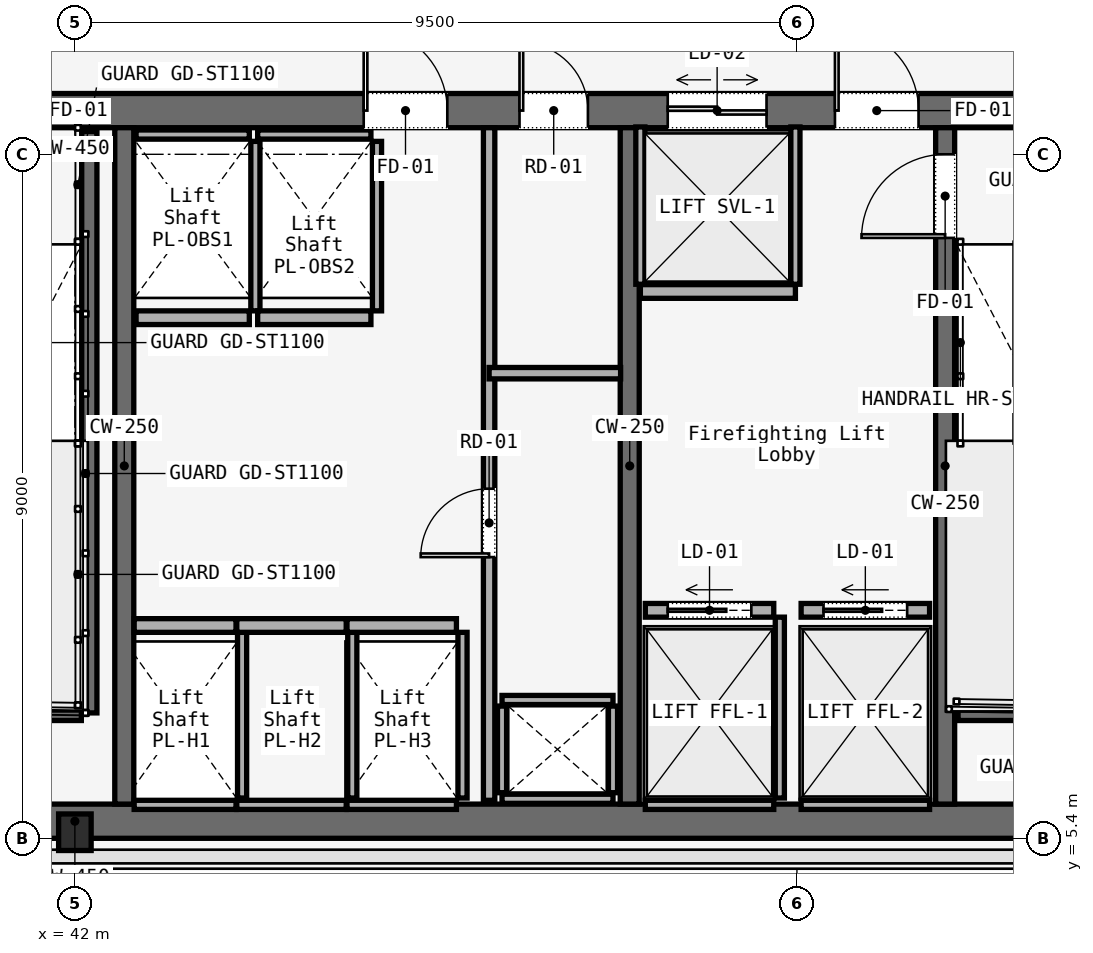
"""IFC4 building model, lengths in metres.
Left out: names, types, materials, properties, quantities, classifications, styles, units other than length and angle.
Written with IfcOpenShell. Run it as: python <this file> out.ifc"""

import sys

from ifc_helpers import new_model, si_unit, direction, frame, frame_2d, origin, origin_2d, place, context, subcontext, project, spatial, rectangle, i_section, extrude, element, fill, save


model = new_model("IFC4")
c1 = context("Model", 3, precision=1e-05, world=origin(), true_north=direction((0.0, 1.0)))
c2 = subcontext(c1, "Body", "Model", "MODEL_VIEW")
j1 = project(units=[si_unit("LENGTHUNIT", "METRE"), si_unit("PLANEANGLEUNIT", "RADIAN")], contexts=[c1])
p1 = place(None, origin())
s1 = spatial("IfcSite", under=j1, at=p1, CompositionType="ELEMENT")
p2 = place(p1, origin())
s2 = spatial("IfcBuilding", under=s1, at=p2, CompositionType="ELEMENT")
p3 = place(p2, frame((0.0, 0.0, 153.6)))
s3 = spatial("IfcBuildingStorey", under=s2, at=p3, CompositionType="ELEMENT", Elevation=153.6)
p4 = place(p3, frame((26.45, 14.975, 0.0), z_axis=(0.0, 0.0, 1.0), x_axis=(1.0, 0.0, 0.0)))
e1 = element("IfcWall", 1, at=p4, inside=s3, PredefinedType="SOLIDWALL", context=c2, shape_type="SweptSolid", body=[
    extrude(rectangle(XDim=31.1, YDim=0.45, at=frame_2d((15.55, 0.0))), origin(), (0.0, 0.0, 1.0), 3.58),
])
p5 = place(p4, frame((1.65, 0.0, 0.0)))
e2 = element("IfcOpeningElement", 2, at=p5, cuts=e1, PredefinedType="OPENING", context=c2, shape_type="SweptSolid", body=[
    extrude(rectangle(XDim=1.1, YDim=2.2, at=frame_2d((0.55, 1.1))), frame((0.0, 0.225, 0.0), z_axis=(0.0, -1.0, 0.0), x_axis=(1.0, 0.0, 0.0)), (0.0, 0.0, 1.0), 0.45),
])
p6 = place(p4, frame((13.65, 0.0, 0.0)))
e3 = element("IfcOpeningElement", 3, at=p6, cuts=e1, PredefinedType="OPENING", context=c2, shape_type="SweptSolid", body=[
    extrude(rectangle(XDim=1.1, YDim=2.2, at=frame_2d((0.55, 1.1))), frame((0.0, 0.225, 0.0), z_axis=(0.0, -1.0, 0.0), x_axis=(1.0, 0.0, 0.0)), (0.0, 0.0, 1.0), 0.45),
])
p7 = place(p4, frame((25.55, 0.0, 0.0)))
e4 = element("IfcOpeningElement", 4, at=p7, cuts=e1, PredefinedType="OPENING", context=c2, shape_type="SweptSolid", body=[
    extrude(rectangle(XDim=1.1, YDim=2.2, at=frame_2d((0.55, 1.1))), frame((0.0, 0.225, 0.0), z_axis=(0.0, -1.0, 0.0), x_axis=(1.0, 0.0, 0.0)), (0.0, 0.0, 1.0), 0.45),
])
p8 = place(p4, frame((10.7, 0.0, 0.0)))
e5 = element("IfcOpeningElement", 5, at=p8, cuts=e1, PredefinedType="OPENING", context=c2, shape_type="SweptSolid", body=[
    extrude(rectangle(XDim=1.4, YDim=2.2, at=frame_2d((0.7, 1.1))), frame((0.0, 0.225, 0.0), z_axis=(0.0, -1.0, 0.0), x_axis=(1.0, 0.0, 0.0)), (0.0, 0.0, 1.0), 0.45),
])
p9 = place(p4, frame((19.35, 0.0, 0.0)))
e6 = element("IfcOpeningElement", 6, at=p9, cuts=e1, PredefinedType="OPENING", context=c2, shape_type="SweptSolid", body=[
    extrude(rectangle(XDim=1.1, YDim=2.2, at=frame_2d((0.55, 1.1))), frame((0.0, 0.225, 0.0), z_axis=(0.0, -1.0, 0.0), x_axis=(1.0, 0.0, 0.0)), (0.0, 0.0, 1.0), 0.45),
])
p10 = place(p4, frame((21.4, 0.0, 0.0)))
e7 = element("IfcOpeningElement", 7, at=p10, cuts=e1, PredefinedType="OPENING", context=c2, shape_type="SweptSolid", body=[
    extrude(rectangle(XDim=0.9, YDim=2.1, at=frame_2d((0.45, 1.05))), frame((0.0, 0.225, 0.0), z_axis=(0.0, -1.0, 0.0), x_axis=(1.0, 0.0, 0.0)), (0.0, 0.0, 1.0), 0.45),
])
p11 = place(p4, frame((23.35, 0.0, 0.0)))
e8 = element("IfcOpeningElement", 8, at=p11, cuts=e1, PredefinedType="OPENING", context=c2, shape_type="SweptSolid", body=[
    extrude(rectangle(XDim=1.3, YDim=2.3, at=frame_2d((0.65, 1.15))), frame((0.0, 0.225, 0.0), z_axis=(0.0, -1.0, 0.0), x_axis=(1.0, 0.0, 0.0)), (0.0, 0.0, 1.0), 0.45),
])
p12 = place(p3, frame((26.45, 5.625, 0.0), z_axis=(0.0, 0.0, 1.0), x_axis=(1.0, 0.0, 0.0)))
e9 = element("IfcWall", 9, at=p12, inside=s3, PredefinedType="SOLIDWALL", context=c2, shape_type="SweptSolid", body=[
    extrude(rectangle(XDim=31.1, YDim=0.45, at=frame_2d((15.55, 0.0))), origin(), (0.0, 0.0, 1.0), 3.58),
])
for number, where, z_axis, x_axis in (
    (10, (42.65, 5.85, 0.0), (0.0, 0.0, 1.0), (0.0, 1.0, 0.0)),
    (11, (49.3, 5.85, 0.0), (0.0, 0.0, 1.0), (0.0, 1.0, 0.0)),
):
    element("IfcWall", number, at=place(p3, frame(where, z_axis=z_axis, x_axis=x_axis)), inside=s3, PredefinedType="SOLIDWALL", context=c2, shape_type="SweptSolid", body=[
        extrude(rectangle(XDim=8.9, YDim=0.25, at=frame_2d((4.45, 0.0))), origin(), (0.0, 0.0, 1.0), 3.58),
    ])
p13 = place(p3, frame((53.45, 5.85, 0.0), z_axis=(0.0, 0.0, 1.0), x_axis=(0.0, 1.0, 0.0)))
e12 = element("IfcWall", 12, at=p13, inside=s3, PredefinedType="SOLIDWALL", context=c2, shape_type="SweptSolid", body=[
    extrude(rectangle(XDim=8.9, YDim=0.25, at=frame_2d((4.45, 0.0))), origin(), (0.0, 0.0, 1.0), 3.58),
])
p14 = place(p13, frame((7.45, 0.0, 0.0)))
e13 = element("IfcOpeningElement", 13, at=p14, cuts=e12, PredefinedType="OPENING", context=c2, shape_type="SweptSolid", body=[
    extrude(rectangle(XDim=1.1, YDim=2.2, at=frame_2d((0.55, 1.1))), frame((0.0, 0.125, 0.0), z_axis=(0.0, -1.0, 0.0), x_axis=(1.0, 0.0, 0.0)), (0.0, 0.0, 1.0), 0.25),
])
p15 = place(p3, frame((42.0, 5.48, 0.0), z_axis=(0.0, 0.0, 1.0), x_axis=(1.0, 0.0, 0.0)))
e14 = element("IfcColumn", 14, at=p15, inside=s3, PredefinedType="COLUMN", context=c2, shape_type="SweptSolid", body=[
    extrude(i_section(OverallWidth=0.428, OverallDepth=0.481, WebThickness=0.051, FlangeThickness=0.065, FilletRadius=0.015, at=origin_2d()), origin(), (0.0, 0.0, 1.0), 3.58),
])
p16 = place(p3, frame((42.19, 14.7, 0.0), z_axis=(0.0, 0.0, 1.0), x_axis=(0.0, -1.0, 0.0)))
e15 = element("IfcWall", 15, at=p16, inside=s3, PredefinedType="SOLIDWALL", context=c2, shape_type="SweptSolid", body=[
    extrude(rectangle(XDim=7.65, YDim=0.2, at=frame_2d((3.825, 0.0))), origin(), (0.0, 0.0, 1.0), 3.8),
])
for number, where, z_axis, x_axis in (
    (16, (38.97, 7.05, 0.0), (0.0, 0.0, 1.0), (1.0, 0.0, 0.0)),
    (17, (53.62, 7.05, 0.0), (0.0, 0.0, 1.0), (1.0, 0.0, 0.0)),
):
    element("IfcWall", number, at=place(p3, frame(where, z_axis=z_axis, x_axis=x_axis)), inside=s3, PredefinedType="SOLIDWALL", context=c2, shape_type="SweptSolid", body=[
        extrude(rectangle(XDim=3.115, YDim=0.2, at=frame_2d((1.558, 0.0))), origin(), (0.0, 0.0, 1.0), 3.8),
    ])
for number, where, z_axis, x_axis in (
    (18, (47.62, 5.92, 0.0), (0.0, 0.0, 1.0), (1.0, 0.0, 0.0)),
    (19, (47.62, 7.22, 0.0), (0.0, 0.0, 1.0), (1.0, 0.0, 0.0)),
):
    element("IfcWall", number, at=place(p3, frame(where, z_axis=z_axis, x_axis=x_axis)), inside=s3, PredefinedType="SOLIDWALL", context=c2, shape_type="SweptSolid", body=[
        extrude(rectangle(XDim=1.46, YDim=0.12, at=frame_2d((0.73, 0.0))), origin(), (0.0, 0.0, 1.0), 3.01),
    ])
for number, where, z_axis, x_axis in (
    (20, (47.62, 6.0, 0.0), (0.0, 0.0, 1.0), (0.0, 1.0, 0.0)),
    (21, (49.08, 6.0, 0.0), (0.0, 0.0, 1.0), (0.0, 1.0, 0.0)),
):
    element("IfcWall", number, at=place(p3, frame(where, z_axis=z_axis, x_axis=x_axis)), inside=s3, PredefinedType="SOLIDWALL", context=c2, shape_type="SweptSolid", body=[
        extrude(rectangle(XDim=1.14, YDim=0.12, at=frame_2d((0.57, 0.0))), origin(), (0.0, 0.0, 1.0), 3.01),
    ])
p17 = place(p3, frame((47.45, 5.9, 0.0), z_axis=(0.0, 0.0, 1.0), x_axis=(0.0, 1.0, 0.0)))
e22 = element("IfcWall", 22, at=p17, inside=s3, PredefinedType="PARTITIONING", context=c2, shape_type="SweptSolid", body=[
    extrude(rectangle(XDim=8.85, YDim=0.15, at=frame_2d((4.425, 0.0))), origin(), (0.0, 0.0, 1.0), 3.01),
])
p18 = place(p17, frame((3.2, 0.0, 0.0)))
e23 = element("IfcOpeningElement", 23, at=p18, cuts=e22, PredefinedType="OPENING", context=c2, shape_type="SweptSolid", body=[
    extrude(rectangle(XDim=0.9, YDim=2.1, at=frame_2d((0.45, 1.05))), frame((0.0, 0.075, 0.0), z_axis=(0.0, -1.0, 0.0), x_axis=(1.0, 0.0, 0.0)), (0.0, 0.0, 1.0), 0.15),
])
p19 = place(p3, frame((47.45, 11.52, 0.0), z_axis=(0.0, 0.0, 1.0), x_axis=(1.0, 0.0, 0.0)))
e24 = element("IfcWall", 24, at=p19, inside=s3, PredefinedType="PARTITIONING", context=c2, shape_type="SweptSolid", body=[
    extrude(rectangle(XDim=1.73, YDim=0.15, at=frame_2d((0.865, 0.0))), origin(), (0.0, 0.0, 1.0), 3.01),
])
p20 = place(p3, frame((42.78, 8.2, 0.0), z_axis=(0.0, 0.0, 1.0), x_axis=(1.0, 0.0, 0.0)))
e25 = element("IfcWall", 25, at=p20, inside=s3, PredefinedType="SOLIDWALL", context=c2, shape_type="SweptSolid", body=[
    extrude(rectangle(XDim=1.34, YDim=0.18, at=frame_2d((0.67, 0.0))), origin(), (0.0, 0.0, 1.0), 3.01),
])
p21 = place(p3, frame((42.78, 5.84, 0.0), z_axis=(0.0, 0.0, 1.0), x_axis=(1.0, 0.0, 0.0)))
e26 = element("IfcWall", 26, at=p21, inside=s3, PredefinedType="SOLIDWALL", context=c2, shape_type="SweptSolid", body=[
    extrude(rectangle(XDim=1.34, YDim=0.12, at=frame_2d((0.67, 0.0))), origin(), (0.0, 0.0, 1.0), 3.01),
])
p22 = place(p3, frame((44.2, 5.93, 0.0), z_axis=(0.0, 0.0, 1.0), x_axis=(0.0, 1.0, 0.0)))
e27 = element("IfcWall", 27, at=p22, inside=s3, PredefinedType="SOLIDWALL", context=c2, shape_type="SweptSolid", body=[
    extrude(rectangle(XDim=2.18, YDim=0.12, at=frame_2d((1.09, 0.0))), origin(), (0.0, 0.0, 1.0), 3.01),
])
p23 = place(p3, frame((44.13, 8.2, 0.0), z_axis=(0.0, 0.0, 1.0), x_axis=(1.0, 0.0, 0.0)))
e28 = element("IfcWall", 28, at=p23, inside=s3, PredefinedType="SOLIDWALL", context=c2, shape_type="SweptSolid", body=[
    extrude(rectangle(XDim=1.44, YDim=0.18, at=frame_2d((0.72, 0.0))), origin(), (0.0, 0.0, 1.0), 3.01),
])
p24 = place(p3, frame((44.13, 5.84, 0.0), z_axis=(0.0, 0.0, 1.0), x_axis=(1.0, 0.0, 0.0)))
e29 = element("IfcWall", 29, at=p24, inside=s3, PredefinedType="SOLIDWALL", context=c2, shape_type="SweptSolid", body=[
    extrude(rectangle(XDim=1.44, YDim=0.12, at=frame_2d((0.72, 0.0))), origin(), (0.0, 0.0, 1.0), 3.01),
])
p25 = place(p3, frame((45.65, 5.93, 0.0), z_axis=(0.0, 0.0, 1.0), x_axis=(0.0, 1.0, 0.0)))
e30 = element("IfcWall", 30, at=p25, inside=s3, PredefinedType="SOLIDWALL", context=c2, shape_type="SweptSolid", body=[
    extrude(rectangle(XDim=2.18, YDim=0.12, at=frame_2d((1.09, 0.0))), origin(), (0.0, 0.0, 1.0), 3.01),
])
p26 = place(p3, frame((45.58, 8.2, 0.0), z_axis=(0.0, 0.0, 1.0), x_axis=(1.0, 0.0, 0.0)))
e31 = element("IfcWall", 31, at=p26, inside=s3, PredefinedType="SOLIDWALL", context=c2, shape_type="SweptSolid", body=[
    extrude(rectangle(XDim=1.44, YDim=0.18, at=frame_2d((0.72, 0.0))), origin(), (0.0, 0.0, 1.0), 3.01),
])
p27 = place(p3, frame((45.58, 5.84, 0.0), z_axis=(0.0, 0.0, 1.0), x_axis=(1.0, 0.0, 0.0)))
e32 = element("IfcWall", 32, at=p27, inside=s3, PredefinedType="SOLIDWALL", context=c2, shape_type="SweptSolid", body=[
    extrude(rectangle(XDim=1.44, YDim=0.12, at=frame_2d((0.72, 0.0))), origin(), (0.0, 0.0, 1.0), 3.01),
])
p28 = place(p3, frame((47.1, 5.93, 0.0), z_axis=(0.0, 0.0, 1.0), x_axis=(0.0, 1.0, 0.0)))
e33 = element("IfcWall", 33, at=p28, inside=s3, PredefinedType="SOLIDWALL", context=c2, shape_type="SweptSolid", body=[
    extrude(rectangle(XDim=2.18, YDim=0.12, at=frame_2d((1.09, 0.0))), origin(), (0.0, 0.0, 1.0), 3.01),
])
p29 = place(p3, frame((42.805, 12.25, 0.0), z_axis=(0.0, 0.0, 1.0), x_axis=(1.0, 0.0, 0.0)))
e34 = element("IfcWall", 34, at=p29, inside=s3, PredefinedType="SOLIDWALL", context=c2, shape_type="SweptSolid", body=[
    extrude(rectangle(XDim=1.49, YDim=0.18, at=frame_2d((0.745, 0.0))), origin(), (0.0, 0.0, 1.0), 3.01),
])
p30 = place(p3, frame((42.805, 14.66, 0.0), z_axis=(0.0, 0.0, 1.0), x_axis=(1.0, 0.0, 0.0)))
e35 = element("IfcWall", 35, at=p30, inside=s3, PredefinedType="SOLIDWALL", context=c2, shape_type="SweptSolid", body=[
    extrude(rectangle(XDim=1.49, YDim=0.12, at=frame_2d((0.745, 0.0))), origin(), (0.0, 0.0, 1.0), 3.01),
])
p31 = place(p3, frame((44.375, 12.34, 0.0), z_axis=(0.0, 0.0, 1.0), x_axis=(0.0, 1.0, 0.0)))
e36 = element("IfcWall", 36, at=p31, inside=s3, PredefinedType="SOLIDWALL", context=c2, shape_type="SweptSolid", body=[
    extrude(rectangle(XDim=2.23, YDim=0.12, at=frame_2d((1.115, 0.0))), origin(), (0.0, 0.0, 1.0), 3.01),
])
p32 = place(p3, frame((44.405, 12.25, 0.0), z_axis=(0.0, 0.0, 1.0), x_axis=(1.0, 0.0, 0.0)))
e37 = element("IfcWall", 37, at=p32, inside=s3, PredefinedType="SOLIDWALL", context=c2, shape_type="SweptSolid", body=[
    extrude(rectangle(XDim=1.49, YDim=0.18, at=frame_2d((0.745, 0.0))), origin(), (0.0, 0.0, 1.0), 3.01),
])
p33 = place(p3, frame((44.405, 14.66, 0.0), z_axis=(0.0, 0.0, 1.0), x_axis=(1.0, 0.0, 0.0)))
e38 = element("IfcWall", 38, at=p33, inside=s3, PredefinedType="SOLIDWALL", context=c2, shape_type="SweptSolid", body=[
    extrude(rectangle(XDim=1.49, YDim=0.12, at=frame_2d((0.745, 0.0))), origin(), (0.0, 0.0, 1.0), 3.01),
])
p34 = place(p3, frame((45.975, 12.34, 0.0), z_axis=(0.0, 0.0, 1.0), x_axis=(0.0, 1.0, 0.0)))
e39 = element("IfcWall", 39, at=p34, inside=s3, PredefinedType="SOLIDWALL", context=c2, shape_type="SweptSolid", body=[
    extrude(rectangle(XDim=2.23, YDim=0.12, at=frame_2d((1.115, 0.0))), origin(), (0.0, 0.0, 1.0), 3.01),
])
p35 = place(p3, frame((49.505, 8.4, 0.0), z_axis=(0.0, 0.0, 1.0), x_axis=(1.0, 0.0, 0.0)))
e40 = element("IfcWall", 40, at=p35, inside=s3, PredefinedType="SOLIDWALL", context=c2, shape_type="SweptSolid", body=[
    extrude(rectangle(XDim=1.69, YDim=0.18, at=frame_2d((0.845, 0.0))), origin(), (0.0, 0.0, 1.0), 3.01),
])
p36 = place(p35, frame((0.295, 0.0, 0.0)))
e41 = element("IfcOpeningElement", 41, at=p36, cuts=e40, PredefinedType="OPENING", context=c2, shape_type="SweptSolid", body=[
    extrude(rectangle(XDim=1.1, YDim=2.2, at=frame_2d((0.55, 1.1))), frame((0.0, 0.09, 0.0), z_axis=(0.0, -1.0, 0.0), x_axis=(1.0, 0.0, 0.0)), (0.0, 0.0, 1.0), 0.18),
])
p37 = place(p3, frame((49.505, 5.84, 0.0), z_axis=(0.0, 0.0, 1.0), x_axis=(1.0, 0.0, 0.0)))
e42 = element("IfcWall", 42, at=p37, inside=s3, PredefinedType="SOLIDWALL", context=c2, shape_type="SweptSolid", body=[
    extrude(rectangle(XDim=1.69, YDim=0.12, at=frame_2d((0.845, 0.0))), origin(), (0.0, 0.0, 1.0), 3.01),
])
p38 = place(p3, frame((51.275, 5.93, 0.0), z_axis=(0.0, 0.0, 1.0), x_axis=(0.0, 1.0, 0.0)))
e43 = element("IfcWall", 43, at=p38, inside=s3, PredefinedType="SOLIDWALL", context=c2, shape_type="SweptSolid", body=[
    extrude(rectangle(XDim=2.38, YDim=0.12, at=frame_2d((1.19, 0.0))), origin(), (0.0, 0.0, 1.0), 3.01),
])
p39 = place(p3, frame((51.555, 8.4, 0.0), z_axis=(0.0, 0.0, 1.0), x_axis=(1.0, 0.0, 0.0)))
e44 = element("IfcWall", 44, at=p39, inside=s3, PredefinedType="SOLIDWALL", context=c2, shape_type="SweptSolid", body=[
    extrude(rectangle(XDim=1.69, YDim=0.18, at=frame_2d((0.845, 0.0))), origin(), (0.0, 0.0, 1.0), 3.01),
])
p40 = place(p39, frame((0.295, 0.0, 0.0)))
e45 = element("IfcOpeningElement", 45, at=p40, cuts=e44, PredefinedType="OPENING", context=c2, shape_type="SweptSolid", body=[
    extrude(rectangle(XDim=1.1, YDim=2.2, at=frame_2d((0.55, 1.1))), frame((0.0, 0.09, 0.0), z_axis=(0.0, -1.0, 0.0), x_axis=(1.0, 0.0, 0.0)), (0.0, 0.0, 1.0), 0.18),
])
p41 = place(p3, frame((51.555, 5.84, 0.0), z_axis=(0.0, 0.0, 1.0), x_axis=(1.0, 0.0, 0.0)))
e46 = element("IfcWall", 46, at=p41, inside=s3, PredefinedType="SOLIDWALL", context=c2, shape_type="SweptSolid", body=[
    extrude(rectangle(XDim=1.69, YDim=0.12, at=frame_2d((0.845, 0.0))), origin(), (0.0, 0.0, 1.0), 3.01),
])
p42 = place(p3, frame((49.44, 12.595, 0.0), z_axis=(0.0, 0.0, 1.0), x_axis=(1.0, 0.0, 0.0)))
e47 = element("IfcWall", 47, at=p42, inside=s3, PredefinedType="SOLIDWALL", context=c2, shape_type="SweptSolid", body=[
    extrude(rectangle(XDim=2.04, YDim=0.18, at=frame_2d((1.02, 0.0))), origin(), (0.0, 0.0, 1.0), 3.01),
])
for number, where, z_axis, x_axis in (
    (48, (49.44, 12.69, 0.0), (0.0, 0.0, 1.0), (0.0, 1.0, 0.0)),
    (49, (51.48, 12.69, 0.0), (0.0, 0.0, 1.0), (0.0, 1.0, 0.0)),
):
    element("IfcWall", number, at=place(p3, frame(where, z_axis=z_axis, x_axis=x_axis)), inside=s3, PredefinedType="SOLIDWALL", context=c2, shape_type="SweptSolid", body=[
        extrude(rectangle(XDim=2.07, YDim=0.12, at=frame_2d((1.035, 0.0))), origin(), (0.0, 0.0, 1.0), 3.01),
    ])
p43 = place(p7, origin())
e50 = element("IfcDoor", 50, at=p43, inside=s3, OperationType="SINGLE_SWING_RIGHT", PredefinedType="DOOR", context=c2, shape_type="SweptSolid", body=[
    extrude(rectangle(XDim=1.1, YDim=2.2, at=frame_2d((0.55, 1.1))), frame((0.0, 0.025, 0.0), z_axis=(0.0, -1.0, 0.0), x_axis=(1.0, 0.0, 0.0)), (0.0, 0.0, 1.0), 0.05),
])
fill(e4, e50)
p44 = place(p9, origin())
e51 = element("IfcDoor", 51, at=p44, inside=s3, OperationType="SINGLE_SWING_LEFT", PredefinedType="DOOR", context=c2, shape_type="SweptSolid", body=[
    extrude(rectangle(XDim=1.1, YDim=2.2, at=frame_2d((0.55, 1.1))), frame((0.0, 0.025, 0.0), z_axis=(0.0, -1.0, 0.0), x_axis=(1.0, 0.0, 0.0)), (0.0, 0.0, 1.0), 0.05),
])
fill(e6, e51)
p45 = place(p10, origin())
e52 = element("IfcDoor", 52, at=p45, inside=s3, OperationType="SINGLE_SWING_LEFT", PredefinedType="DOOR", context=c2, shape_type="SweptSolid", body=[
    extrude(rectangle(XDim=0.9, YDim=2.1, at=frame_2d((0.45, 1.05))), frame((0.0, 0.025, 0.0), z_axis=(0.0, -1.0, 0.0), x_axis=(1.0, 0.0, 0.0)), (0.0, 0.0, 1.0), 0.05),
])
fill(e7, e52)
p46 = place(p14, origin())
e53 = element("IfcDoor", 53, at=p46, inside=s3, OperationType="SINGLE_SWING_LEFT", PredefinedType="DOOR", context=c2, shape_type="SweptSolid", body=[
    extrude(rectangle(XDim=1.1, YDim=2.2, at=frame_2d((0.55, 1.1))), frame((0.0, 0.025, 0.0), z_axis=(0.0, -1.0, 0.0), x_axis=(1.0, 0.0, 0.0)), (0.0, 0.0, 1.0), 0.05),
])
fill(e13, e53)
p47 = place(p18, origin())
e54 = element("IfcDoor", 54, at=p47, inside=s3, OperationType="SINGLE_SWING_LEFT", PredefinedType="DOOR", context=c2, shape_type="SweptSolid", body=[
    extrude(rectangle(XDim=0.9, YDim=2.1, at=frame_2d((0.45, 1.05))), frame((0.0, 0.025, 0.0), z_axis=(0.0, -1.0, 0.0), x_axis=(1.0, 0.0, 0.0)), (0.0, 0.0, 1.0), 0.05),
])
fill(e23, e54)
p48 = place(p36, origin())
e55 = element("IfcDoor", 55, at=p48, inside=s3, OperationType="SLIDING_TO_LEFT", PredefinedType="DOOR", context=c2, shape_type="SweptSolid", body=[
    extrude(rectangle(XDim=1.1, YDim=2.2, at=frame_2d((0.55, 1.1))), frame((0.0, 0.025, 0.0), z_axis=(0.0, -1.0, 0.0), x_axis=(1.0, 0.0, 0.0)), (0.0, 0.0, 1.0), 0.05),
])
fill(e41, e55)
p49 = place(p40, origin())
e56 = element("IfcDoor", 56, at=p49, inside=s3, OperationType="SLIDING_TO_LEFT", PredefinedType="DOOR", context=c2, shape_type="SweptSolid", body=[
    extrude(rectangle(XDim=1.1, YDim=2.2, at=frame_2d((0.55, 1.1))), frame((0.0, 0.025, 0.0), z_axis=(0.0, -1.0, 0.0), x_axis=(1.0, 0.0, 0.0)), (0.0, 0.0, 1.0), 0.05),
])
fill(e45, e56)
p50 = place(p11, origin())
e57 = element("IfcDoor", 57, at=p50, inside=s3, OperationType="DOUBLE_DOOR_SLIDING", PredefinedType="DOOR", context=c2, shape_type="SweptSolid", body=[
    extrude(rectangle(XDim=1.3, YDim=2.3, at=frame_2d((0.65, 1.15))), frame((0.0, 0.025, 0.0), z_axis=(0.0, -1.0, 0.0), x_axis=(1.0, 0.0, 0.0)), (0.0, 0.0, 1.0), 0.05),
])
fill(e8, e57)
save(model, sys.argv[1])
